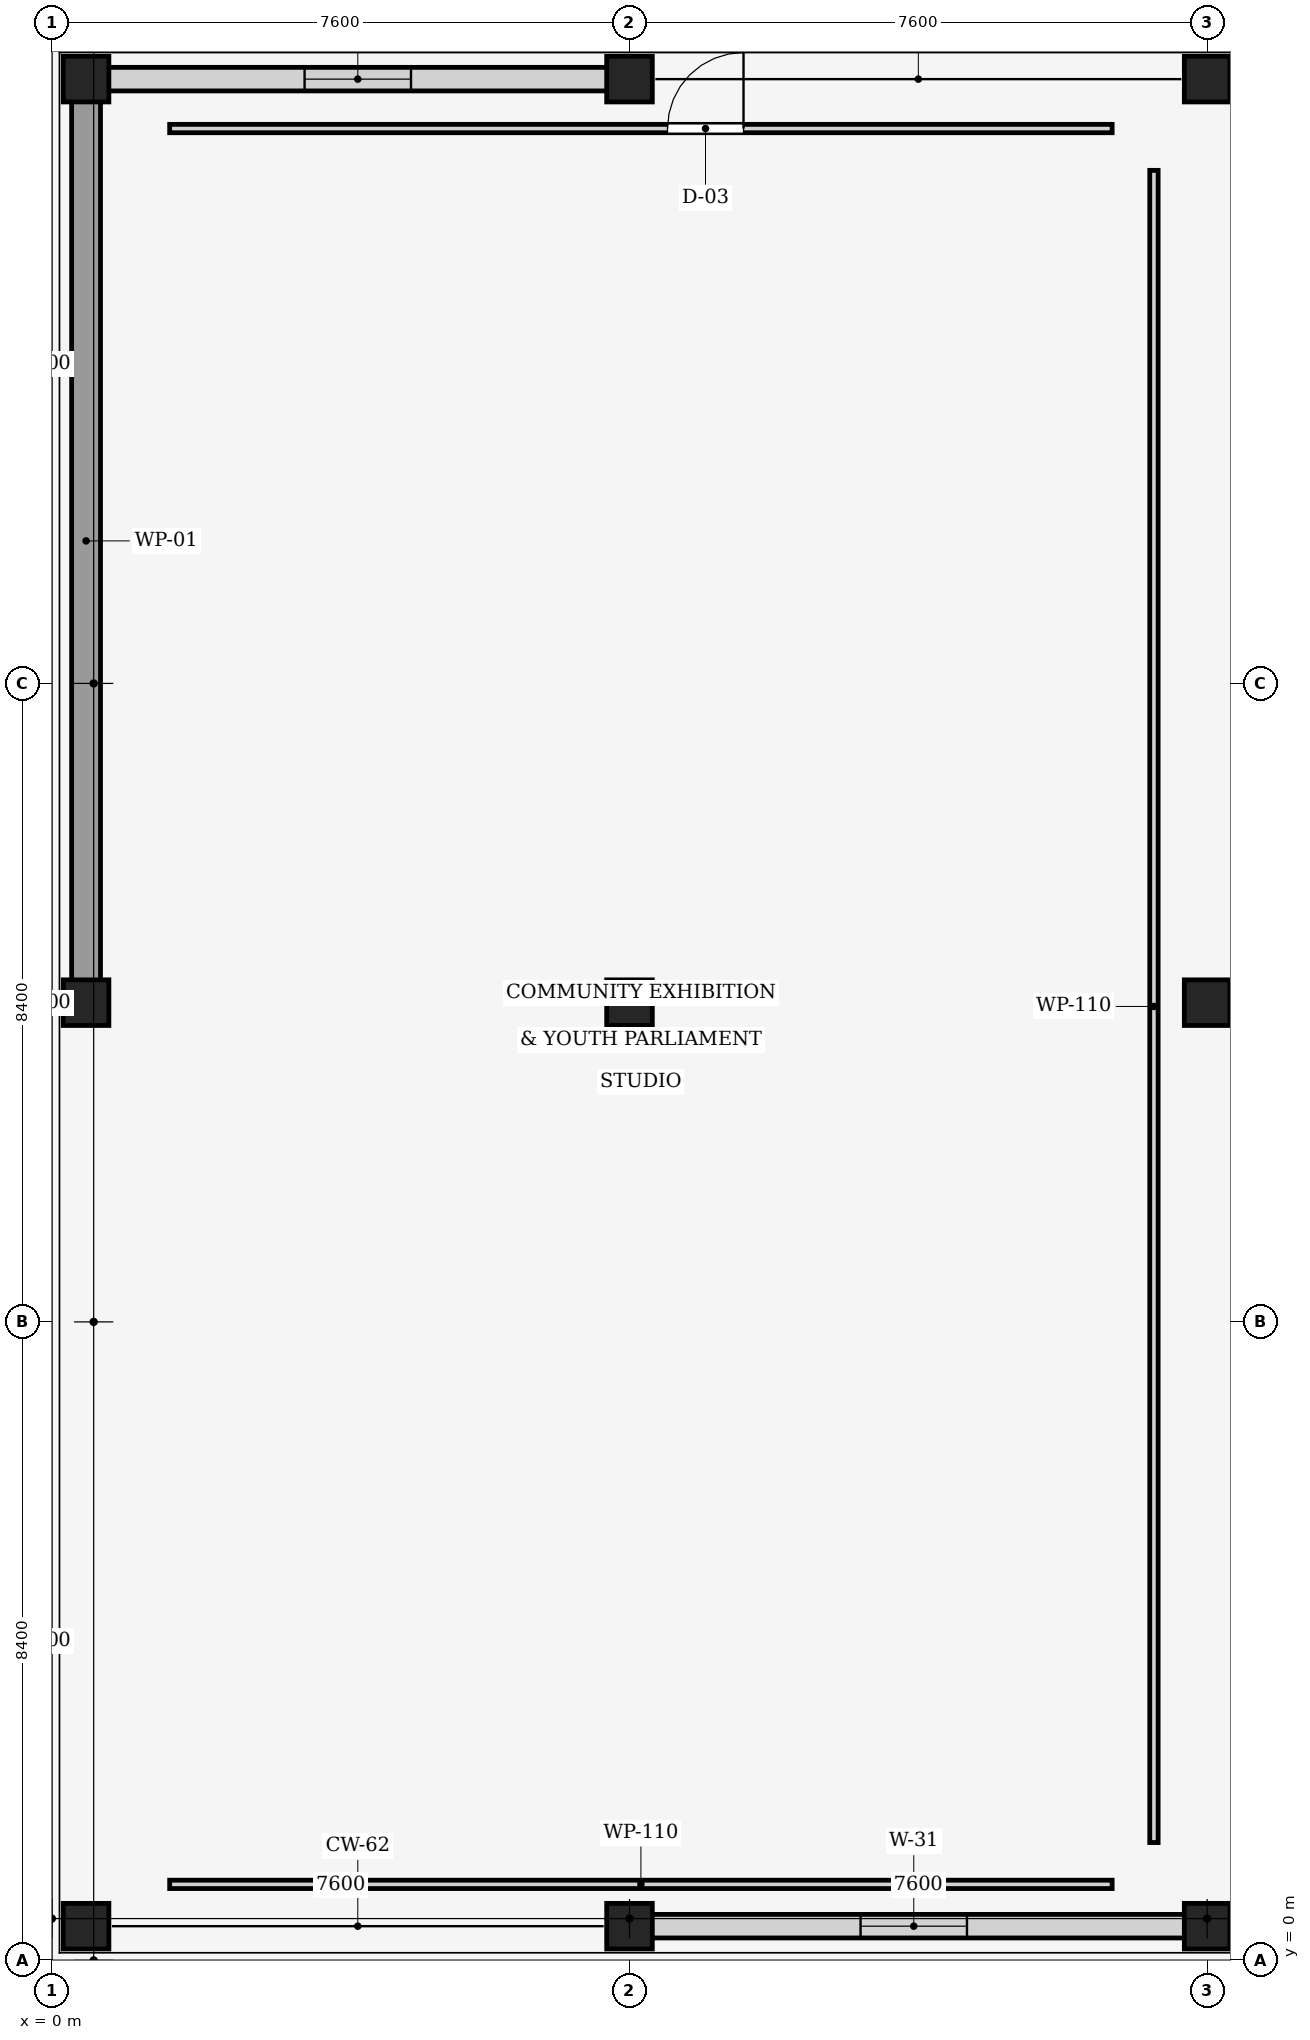
"""IFC4 building model, lengths in metres.
Left out: names, types, materials, properties, quantities, classifications, styles, units other than length and angle.
Written with IfcOpenShell. Run it as: python <this file> out.ifc"""

import sys

from ifc_helpers import new_model, si_unit, direction, frame, frame_2d, origin, origin_2d, place, context, subcontext, project, spatial, rectangle, extrude, element, fill, save


model = new_model("IFC4")
c1 = context("Model", 3, precision=1e-05, world=origin(), true_north=direction((0.0, 1.0)))
c2 = subcontext(c1, "Body", "Model", "MODEL_VIEW")
j1 = project(units=[si_unit("LENGTHUNIT", "METRE"), si_unit("PLANEANGLEUNIT", "RADIAN")], contexts=[c1])
p1 = place(None, origin())
s1 = spatial("IfcSite", under=j1, at=p1, CompositionType="ELEMENT")
p2 = place(p1, origin())
s2 = spatial("IfcBuilding", under=s1, at=p2, CompositionType="ELEMENT")
p3 = place(p2, frame((0.0, 0.0, 5.1)))
s3 = spatial("IfcBuildingStorey", under=s2, at=p3, CompositionType="ELEMENT", Elevation=5.1)
p4 = place(p3, frame((0.45, 0.45, 0.0), z_axis=(0.0, 0.0, 1.0), x_axis=(1.0, 0.0, 0.0)))
e1 = element("IfcColumn", 1, at=p4, inside=s3, PredefinedType="COLUMN", context=c2, shape_type="SweptSolid", body=[
    extrude(rectangle(XDim=0.6, YDim=0.6, at=origin_2d()), origin(), (0.0, 0.0, 1.0), 4.05),
])
p5 = place(p3, frame((0.45, 12.6, 0.0), z_axis=(0.0, 0.0, 1.0), x_axis=(1.0, 0.0, 0.0)))
e2 = element("IfcColumn", 2, at=p5, inside=s3, PredefinedType="COLUMN", context=c2, shape_type="SweptSolid", body=[
    extrude(rectangle(XDim=0.6, YDim=0.6, at=origin_2d()), origin(), (0.0, 0.0, 1.0), 7.0),
])
for number, where, z_axis, x_axis in (
    (3, (0.45, 24.75, 0.0), (0.0, 0.0, 1.0), (1.0, 0.0, 0.0)),
    (4, (7.6, 0.45, 0.0), (0.0, 0.0, 1.0), (1.0, 0.0, 0.0)),
):
    element("IfcColumn", number, at=place(p3, frame(where, z_axis=z_axis, x_axis=x_axis)), inside=s3, PredefinedType="COLUMN", context=c2, shape_type="SweptSolid", body=[
        extrude(rectangle(XDim=0.6, YDim=0.6, at=origin_2d()), origin(), (0.0, 0.0, 1.0), 4.05),
    ])
p6 = place(p3, frame((7.6, 12.6, 0.0), z_axis=(0.0, 0.0, 1.0), x_axis=(1.0, 0.0, 0.0)))
e5 = element("IfcColumn", 5, at=p6, inside=s3, PredefinedType="COLUMN", context=c2, shape_type="SweptSolid", body=[
    extrude(rectangle(XDim=0.6, YDim=0.6, at=origin_2d()), origin(), (0.0, 0.0, 1.0), 7.0),
])
for number, where, z_axis, x_axis in (
    (6, (7.6, 24.75, 0.0), (0.0, 0.0, 1.0), (1.0, 0.0, 0.0)),
    (7, (15.2, 0.45, 0.0), (0.0, 0.0, 1.0), (1.0, 0.0, 0.0)),
):
    element("IfcColumn", number, at=place(p3, frame(where, z_axis=z_axis, x_axis=x_axis)), inside=s3, PredefinedType="COLUMN", context=c2, shape_type="SweptSolid", body=[
        extrude(rectangle(XDim=0.6, YDim=0.6, at=origin_2d()), origin(), (0.0, 0.0, 1.0), 4.05),
    ])
p7 = place(p3, frame((15.2, 12.6, 0.0), z_axis=(0.0, 0.0, 1.0), x_axis=(1.0, 0.0, 0.0)))
e8 = element("IfcColumn", 8, at=p7, inside=s3, PredefinedType="COLUMN", context=c2, shape_type="SweptSolid", body=[
    extrude(rectangle(XDim=0.6, YDim=0.6, at=origin_2d()), origin(), (0.0, 0.0, 1.0), 7.0),
])
p8 = place(p3, frame((15.2, 24.75, 0.0), z_axis=(0.0, 0.0, 1.0), x_axis=(1.0, 0.0, 0.0)))
e9 = element("IfcColumn", 9, at=p8, inside=s3, PredefinedType="COLUMN", context=c2, shape_type="SweptSolid", body=[
    extrude(rectangle(XDim=0.6, YDim=0.6, at=origin_2d()), origin(), (0.0, 0.0, 1.0), 4.05),
])
p9 = place(p3, frame((14.965, 0.45, 0.0), z_axis=(0.0, 0.0, 1.0), x_axis=(-1.0, 0.0, 0.0)))
e10 = element("IfcWall", 10, at=p9, inside=s3, PredefinedType="STANDARD", context=c2, shape_type="SweptSolid", body=[
    extrude(rectangle(XDim=7.25, YDim=0.31, at=frame_2d((3.625, 0.0))), origin(), (0.0, 0.0, 1.0), 3.405),
])
p10 = place(p9, frame((2.925, 0.0, 0.85)))
e11 = element("IfcOpeningElement", 11, at=p10, cuts=e10, PredefinedType="OPENING", context=c2, shape_type="SweptSolid", body=[
    extrude(rectangle(XDim=1.4, YDim=2.05, at=frame_2d((0.7, 1.025))), frame((0.0, 0.165, 0.0), z_axis=(0.0, -1.0, 0.0), x_axis=(1.0, 0.0, 0.0)), (0.0, 0.0, 1.0), 0.33),
])
p11 = place(p3, frame((0.685, 24.75, 0.0), z_axis=(0.0, 0.0, 1.0), x_axis=(1.0, 0.0, 0.0)))
e12 = element("IfcWall", 12, at=p11, inside=s3, PredefinedType="STANDARD", context=c2, shape_type="SweptSolid", body=[
    extrude(rectangle(XDim=6.68, YDim=0.31, at=frame_2d((3.34, 0.0))), origin(), (0.0, 0.0, 1.0), 3.405),
])
p12 = place(p11, frame((2.64, 0.0, 0.85)))
e13 = element("IfcOpeningElement", 13, at=p12, cuts=e12, PredefinedType="OPENING", context=c2, shape_type="SweptSolid", body=[
    extrude(rectangle(XDim=1.4, YDim=2.05, at=frame_2d((0.7, 1.025))), frame((0.0, 0.165, 0.0), z_axis=(0.0, -1.0, 0.0), x_axis=(1.0, 0.0, 0.0)), (0.0, 0.0, 1.0), 0.33),
])
p13 = place(p3, frame((15.435, 24.75, 0.0), z_axis=(0.0, 0.0, 1.0), x_axis=(1.0, 0.0, 0.0)))
e14 = element("IfcWall", 14, at=p13, inside=s3, PredefinedType="STANDARD", context=c2, shape_type="SweptSolid", body=[
    extrude(rectangle(XDim=7.25, YDim=0.31, at=frame_2d((3.625, 0.0))), origin(), (0.0, 0.0, 1.0), 3.405),
])
p14 = place(p13, frame((2.625, 0.0, 0.85)))
e15 = element("IfcOpeningElement", 15, at=p14, cuts=e14, PredefinedType="OPENING", context=c2, shape_type="SweptSolid", body=[
    extrude(rectangle(XDim=2.0, YDim=2.05, at=frame_2d((1.0, 1.025))), frame((0.0, 0.165, 0.0), z_axis=(0.0, -1.0, 0.0), x_axis=(1.0, 0.0, 0.0)), (0.0, 0.0, 1.0), 0.33),
])
p15 = place(p3, frame((0.45, 12.835, 0.0), z_axis=(0.0, 0.0, 1.0), x_axis=(0.0, 1.0, 0.0)))
e16 = element("IfcWall", 16, at=p15, inside=s3, PredefinedType="SHEAR", context=c2, shape_type="SweptSolid", body=[
    extrude(rectangle(XDim=11.68, YDim=0.38, at=frame_2d((5.84, 0.0))), origin(), (0.0, 0.0, 1.0), 3.7),
])
p16 = place(p3, frame((14.5, 23.55, 0.0), z_axis=(0.0, 0.0, 1.0), x_axis=(0.0, -1.0, 0.0)))
e17 = element("IfcWall", 17, at=p16, inside=s3, PredefinedType="PARTITIONING", context=c2, shape_type="SweptSolid", body=[
    extrude(rectangle(XDim=22.0, YDim=0.11, at=frame_2d((11.0, 0.0))), origin(), (0.0, 0.0, 1.0), 3.67),
])
p17 = place(p3, frame((1.55, 24.1, 0.0), z_axis=(0.0, 0.0, 1.0), x_axis=(1.0, 0.0, 0.0)))
e18 = element("IfcWall", 18, at=p17, inside=s3, PredefinedType="PARTITIONING", context=c2, shape_type="SweptSolid", body=[
    extrude(rectangle(XDim=12.4, YDim=0.11, at=frame_2d((6.2, 0.0))), origin(), (0.0, 0.0, 1.0), 3.67),
])
p18 = place(p17, frame((6.55, 0.0, 0.0)))
e19 = element("IfcOpeningElement", 19, at=p18, cuts=e18, PredefinedType="OPENING", context=c2, shape_type="SweptSolid", body=[
    extrude(rectangle(XDim=1.0, YDim=2.1, at=frame_2d((0.5, 1.05))), frame((0.0, 0.065, 0.0), z_axis=(0.0, -1.0, 0.0), x_axis=(1.0, 0.0, 0.0)), (0.0, 0.0, 1.0), 0.13),
])
p19 = place(p3, frame((13.95, 1.0, 0.0), z_axis=(0.0, 0.0, 1.0), x_axis=(-1.0, 0.0, 0.0)))
e20 = element("IfcWall", 20, at=p19, inside=s3, PredefinedType="PARTITIONING", context=c2, shape_type="SweptSolid", body=[
    extrude(rectangle(XDim=12.4, YDim=0.11, at=frame_2d((6.2, 0.0))), origin(), (0.0, 0.0, 1.0), 3.67),
])
p20 = place(p10, origin())
e21 = element("IfcWindow", 21, at=p20, inside=s3, PartitioningType="SINGLE_PANEL", PredefinedType="WINDOW", context=c2, shape_type="SweptSolid", body=[
    extrude(rectangle(XDim=1.4, YDim=2.05, at=frame_2d((0.7, 1.025))), frame((0.0, 0.03, 0.0), z_axis=(0.0, -1.0, 0.0), x_axis=(1.0, 0.0, 0.0)), (0.0, 0.0, 1.0), 0.06),
])
fill(e11, e21)
p21 = place(p12, origin())
e22 = element("IfcWindow", 22, at=p21, inside=s3, PartitioningType="SINGLE_PANEL", PredefinedType="WINDOW", context=c2, shape_type="SweptSolid", body=[
    extrude(rectangle(XDim=1.4, YDim=2.05, at=frame_2d((0.7, 1.025))), frame((0.0, 0.03, 0.0), z_axis=(0.0, -1.0, 0.0), x_axis=(1.0, 0.0, 0.0)), (0.0, 0.0, 1.0), 0.06),
])
fill(e13, e22)
p22 = place(p18, origin())
e23 = element("IfcDoor", 23, at=p22, inside=s3, OperationType="SINGLE_SWING_RIGHT", PredefinedType="DOOR", context=c2, shape_type="SweptSolid", body=[
    extrude(rectangle(XDim=1.0, YDim=2.1, at=frame_2d((0.5, 1.05))), frame((0.0, 0.025, 0.0), z_axis=(0.0, -1.0, 0.0), x_axis=(1.0, 0.0, 0.0)), (0.0, 0.0, 1.0), 0.05),
])
fill(e19, e23)
save(model, sys.argv[1])
